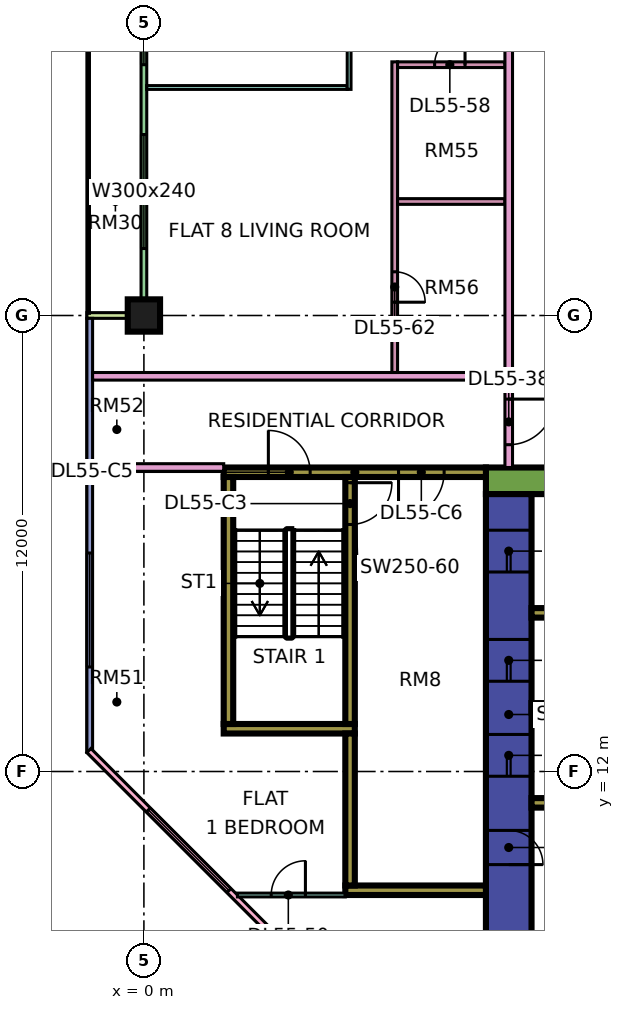
"""IFC4 building model, lengths in metres.
Left out: names, types, materials, properties, quantities, classifications, styles, units other than length and angle.
Written with IfcOpenShell. Run it as: python <this file> out.ifc"""

import sys

from ifc_helpers import new_model, si_unit, direction, frame, frame_2d, origin, origin_2d, place, context, subcontext, project, spatial, rectangle, extrude, element, fill, save


model = new_model("IFC4")
c1 = context("Model", 3, precision=1e-05, world=origin(), true_north=direction((0.0, 1.0)))
c2 = subcontext(c1, "Body", "Model", "MODEL_VIEW")
j1 = project(units=[si_unit("LENGTHUNIT", "METRE"), si_unit("PLANEANGLEUNIT", "RADIAN")], contexts=[c1])
p1 = place(None, origin())
s1 = spatial("IfcSite", under=j1, at=p1, CompositionType="ELEMENT")
p2 = place(p1, origin())
s2 = spatial("IfcBuilding", under=s1, at=p2, CompositionType="ELEMENT")
p3 = place(p2, frame((0.0, 0.0, 234.15)))
s3 = spatial("IfcBuildingStorey", under=s2, at=p3, CompositionType="ELEMENT", Elevation=234.15)
p4 = place(p3, frame((0.0, 24.0, 0.0), z_axis=(0.0, 0.0, 1.0), x_axis=(1.0, 0.0, 0.0)))
e1 = element("IfcColumn", 1, at=p4, inside=s3, PredefinedType="COLUMN", context=c2, shape_type="SweptSolid", body=[
    extrude(rectangle(XDim=0.85, YDim=0.85, at=origin_2d()), origin(), (0.0, 0.0, 1.0), 3.75),
])
p5 = place(p3, frame((9.0, 19.65, 0.0), z_axis=(0.0, 0.0, 1.0), x_axis=(1.0, 0.0, 0.0)))
e2 = element("IfcWall", 2, at=p5, inside=s3, PredefinedType="SHEAR", context=c2, shape_type="SweptSolid", body=[
    extrude(rectangle(XDim=25.0, YDim=0.7, at=frame_2d((12.5, 0.0))), origin(), (0.0, 0.0, 1.0), 3.75),
])
p6 = place(p5, frame((19.1, 0.0, 0.0)))
e3 = element("IfcOpeningElement", 3, at=p6, cuts=e2, PredefinedType="OPENING", context=c2, shape_type="SweptSolid", body=[
    extrude(rectangle(XDim=1.8, YDim=2.4, at=frame_2d((0.9, 1.2))), frame((0.0, 0.36, 0.0), z_axis=(0.0, -1.0, 0.0), x_axis=(1.0, 0.0, 0.0)), (0.0, 0.0, 1.0), 0.72),
])
p7 = place(p3, frame((9.6, 7.7, 0.0), z_axis=(0.0, 0.0, 1.0), x_axis=(0.0, 1.0, 0.0)))
e4 = element("IfcWall", 4, at=p7, inside=s3, PredefinedType="SHEAR", context=c2, shape_type="SweptSolid", body=[
    extrude(rectangle(XDim=11.6, YDim=1.2, at=frame_2d((5.8, 0.0))), origin(), (0.0, 0.0, 1.0), 3.75),
])
p8 = place(p7, frame((4.175, 0.0, 0.0)))
e5 = element("IfcOpeningElement", 5, at=p8, cuts=e4, PredefinedType="OPENING", context=c2, shape_type="SweptSolid", body=[
    extrude(rectangle(XDim=1.1, YDim=2.2, at=frame_2d((0.55, 1.1))), frame((0.0, 0.61, 0.0), z_axis=(0.0, -1.0, 0.0), x_axis=(1.0, 0.0, 0.0)), (0.0, 0.0, 1.0), 1.22),
])
p9 = place(p7, frame((6.675, 0.0, 0.0)))
e6 = element("IfcOpeningElement", 6, at=p9, cuts=e4, PredefinedType="OPENING", context=c2, shape_type="SweptSolid", body=[
    extrude(rectangle(XDim=1.1, YDim=2.2, at=frame_2d((0.55, 1.1))), frame((0.0, 0.61, 0.0), z_axis=(0.0, -1.0, 0.0), x_axis=(1.0, 0.0, 0.0)), (0.0, 0.0, 1.0), 1.22),
])
p10 = place(p7, frame((9.55, 0.0, 0.0)))
e7 = element("IfcOpeningElement", 7, at=p10, cuts=e4, PredefinedType="OPENING", context=c2, shape_type="SweptSolid", body=[
    extrude(rectangle(XDim=1.1, YDim=2.2, at=frame_2d((0.55, 1.1))), frame((0.0, 0.61, 0.0), z_axis=(0.0, -1.0, 0.0), x_axis=(1.0, 0.0, 0.0)), (0.0, 0.0, 1.0), 1.22),
])
p11 = place(p7, frame((1.85, 0.0, 0.0)))
e8 = element("IfcOpeningElement", 8, at=p11, cuts=e4, PredefinedType="OPENING", context=c2, shape_type="SweptSolid", body=[
    extrude(rectangle(XDim=0.9, YDim=2.1, at=frame_2d((0.45, 1.05))), frame((0.0, 0.61, 0.0), z_axis=(0.0, -1.0, 0.0), x_axis=(1.0, 0.0, 0.0)), (0.0, 0.0, 1.0), 1.22),
])
for number, where, z_axis, x_axis in (
    (9, (10.2, 11.175, 0.0), (0.0, 0.0, 1.0), (1.0, 0.0, 0.0)),
    (10, (10.2, 13.675, 0.0), (0.0, 0.0, 1.0), (1.0, 0.0, 0.0)),
    (11, (10.2, 16.175, 0.0), (0.0, 0.0, 1.0), (1.0, 0.0, 0.0)),
):
    element("IfcWall", number, at=place(p3, frame(where, z_axis=z_axis, x_axis=x_axis)), inside=s3, PredefinedType="SHEAR", context=c2, shape_type="SweptSolid", body=[
        extrude(rectangle(XDim=3.0, YDim=0.25, at=frame_2d((1.5, 0.0))), origin(), (0.0, 0.0, 1.0), 3.75),
    ])
p12 = place(p3, frame((2.1, 19.875, 0.0), z_axis=(0.0, 0.0, 1.0), x_axis=(1.0, 0.0, 0.0)))
e12 = element("IfcWall", 12, at=p12, inside=s3, PredefinedType="SHEAR", context=c2, shape_type="SweptSolid", body=[
    extrude(rectangle(XDim=6.9, YDim=0.25, at=frame_2d((3.45, 0.0))), origin(), (0.0, 0.0, 1.0), 3.75),
])
p13 = place(p12, frame((1.175, 0.0, 0.0)))
e13 = element("IfcOpeningElement", 13, at=p13, cuts=e12, PredefinedType="OPENING", context=c2, shape_type="SweptSolid", body=[
    extrude(rectangle(XDim=1.1, YDim=2.2, at=frame_2d((0.55, 1.1))), frame((0.0, 0.135, 0.0), z_axis=(0.0, -1.0, 0.0), x_axis=(1.0, 0.0, 0.0)), (0.0, 0.0, 1.0), 0.27),
])
p14 = place(p12, frame((4.6, 0.0, 0.0)))
e14 = element("IfcOpeningElement", 14, at=p14, cuts=e12, PredefinedType="OPENING", context=c2, shape_type="SweptSolid", body=[
    extrude(rectangle(XDim=1.2, YDim=2.2, at=frame_2d((0.6, 1.1))), frame((0.0, 0.135, 0.0), z_axis=(0.0, -1.0, 0.0), x_axis=(1.0, 0.0, 0.0)), (0.0, 0.0, 1.0), 0.27),
])
p15 = place(p3, frame((2.1, 13.125, 0.0), z_axis=(0.0, 0.0, 1.0), x_axis=(1.0, 0.0, 0.0)))
e15 = element("IfcWall", 15, at=p15, inside=s3, PredefinedType="SHEAR", context=c2, shape_type="SweptSolid", body=[
    extrude(rectangle(XDim=3.45, YDim=0.25, at=frame_2d((1.725, 0.0))), origin(), (0.0, 0.0, 1.0), 3.75),
])
p16 = place(p3, frame((2.225, 13.25, 0.0), z_axis=(0.0, 0.0, 1.0), x_axis=(0.0, 1.0, 0.0)))
e16 = element("IfcWall", 16, at=p16, inside=s3, PredefinedType="SHEAR", context=c2, shape_type="SweptSolid", body=[
    extrude(rectangle(XDim=6.5, YDim=0.25, at=frame_2d((3.25, 0.0))), origin(), (0.0, 0.0, 1.0), 3.75),
])
p17 = place(p3, frame((5.425, 13.25, 0.0), z_axis=(0.0, 0.0, 1.0), x_axis=(0.0, 1.0, 0.0)))
e17 = element("IfcWall", 17, at=p17, inside=s3, PredefinedType="SHEAR", context=c2, shape_type="SweptSolid", body=[
    extrude(rectangle(XDim=6.5, YDim=0.25, at=frame_2d((3.25, 0.0))), origin(), (0.0, 0.0, 1.0), 3.75),
])
p18 = place(p17, frame((5.25, 0.0, 0.0)))
e18 = element("IfcOpeningElement", 18, at=p18, cuts=e17, PredefinedType="OPENING", context=c2, shape_type="SweptSolid", body=[
    extrude(rectangle(XDim=1.1, YDim=2.2, at=frame_2d((0.55, 1.1))), frame((0.0, 0.135, 0.0), z_axis=(0.0, -1.0, 0.0), x_axis=(1.0, 0.0, 0.0)), (0.0, 0.0, 1.0), 0.27),
])
p19 = place(p3, frame((5.3, 8.875, 0.0), z_axis=(0.0, 0.0, 1.0), x_axis=(1.0, 0.0, 0.0)))
e19 = element("IfcWall", 19, at=p19, inside=s3, PredefinedType="SHEAR", context=c2, shape_type="SweptSolid", body=[
    extrude(rectangle(XDim=3.7, YDim=0.25, at=frame_2d((1.85, 0.0))), origin(), (0.0, 0.0, 1.0), 3.75),
])
p20 = place(p3, frame((5.425, 9.0, 0.0), z_axis=(0.0, 0.0, 1.0), x_axis=(0.0, 1.0, 0.0)))
e20 = element("IfcWall", 20, at=p20, inside=s3, PredefinedType="SHEAR", context=c2, shape_type="SweptSolid", body=[
    extrude(rectangle(XDim=4.0, YDim=0.25, at=frame_2d((2.0, 0.0))), origin(), (0.0, 0.0, 1.0), 3.75),
])
p21 = place(p3, frame((0.0, 35.925, 0.0), z_axis=(0.0, 0.0, 1.0), x_axis=(0.0, -1.0, 0.0)))
e21 = element("IfcWall", 21, at=p21, inside=s3, PredefinedType="SOLIDWALL", context=c2, shape_type="SweptSolid", body=[
    extrude(rectangle(XDim=11.85, YDim=0.15, at=frame_2d((5.925, 0.0))), origin(), (0.0, 0.0, 1.0), 3.35),
])
p22 = place(p21, frame((1.087, 0.0, 0.0)))
e22 = element("IfcOpeningElement", 22, at=p22, cuts=e21, PredefinedType="OPENING", context=c2, shape_type="SweptSolid", body=[
    extrude(rectangle(XDim=1.2, YDim=2.4, at=frame_2d((0.6, 1.2))), frame((0.0, 0.085, 0.0), z_axis=(0.0, -1.0, 0.0), x_axis=(1.0, 0.0, 0.0)), (0.0, 0.0, 1.0), 0.17),
])
p23 = place(p21, frame((3.525, 0.0, 0.45)))
e23 = element("IfcOpeningElement", 23, at=p23, cuts=e21, PredefinedType="OPENING", context=c2, shape_type="SweptSolid", body=[
    extrude(rectangle(XDim=1.8, YDim=2.4, at=frame_2d((0.9, 1.2))), frame((0.0, 0.085, 0.0), z_axis=(0.0, -1.0, 0.0), x_axis=(1.0, 0.0, 0.0)), (0.0, 0.0, 1.0), 0.17),
])
p24 = place(p21, frame((7.163, 0.0, 0.45)))
e24 = element("IfcOpeningElement", 24, at=p24, cuts=e21, PredefinedType="OPENING", context=c2, shape_type="SweptSolid", body=[
    extrude(rectangle(XDim=3.0, YDim=2.4, at=frame_2d((1.5, 1.2))), frame((0.0, 0.085, 0.0), z_axis=(0.0, -1.0, 0.0), x_axis=(1.0, 0.0, 0.0)), (0.0, 0.0, 1.0), 0.17),
])
p25 = place(p3, frame((-1.5, 24.0, 0.0), z_axis=(0.0, 0.0, 1.0), x_axis=(1.0, 0.0, 0.0)))
e25 = element("IfcWall", 25, at=p25, inside=s3, PredefinedType="SOLIDWALL", context=c2, shape_type="SweptSolid", body=[
    extrude(rectangle(XDim=1.5, YDim=0.15, at=frame_2d((0.75, 0.0))), origin(), (0.0, 0.0, 1.0), 3.35),
])
p26 = place(p3, frame((-1.425, 23.925, 0.0), z_axis=(0.0, 0.0, 1.0), x_axis=(0.0, -1.0, 0.0)))
e26 = element("IfcWall", 26, at=p26, inside=s3, PredefinedType="SOLIDWALL", context=c2, shape_type="SweptSolid", body=[
    extrude(rectangle(XDim=11.425, YDim=0.15, at=frame_2d((5.712, 0.0))), origin(), (0.0, 0.0, 1.0), 3.35),
])
p27 = place(p26, frame((6.175, 0.0, 0.45)))
e27 = element("IfcOpeningElement", 27, at=p27, cuts=e26, PredefinedType="OPENING", context=c2, shape_type="SweptSolid", body=[
    extrude(rectangle(XDim=3.0, YDim=2.4, at=frame_2d((1.5, 1.2))), frame((0.0, 0.085, 0.0), z_axis=(0.0, -1.0, 0.0), x_axis=(1.0, 0.0, 0.0)), (0.0, 0.0, 1.0), 0.17),
])
p28 = place(p3, frame((-1.447, 12.553, 0.0), z_axis=(0.0, 0.0, 1.0), x_axis=(0.707106781187, -0.707106781187, 0.0)))
e28 = element("IfcWall", 28, at=p28, inside=s3, PredefinedType="SOLIDWALL", context=c2, shape_type="SweptSolid", body=[
    extrude(rectangle(XDim=19.799, YDim=0.15, at=frame_2d((9.899, 0.0))), origin(), (0.0, 0.0, 1.0), 3.35),
])
p29 = place(p28, frame((2.212, 0.0, 0.45)))
e29 = element("IfcOpeningElement", 29, at=p29, cuts=e28, PredefinedType="OPENING", context=c2, shape_type="SweptSolid", body=[
    extrude(rectangle(XDim=3.0, YDim=2.4, at=frame_2d((1.5, 1.2))), frame((0.0, 0.085, 0.0), z_axis=(0.0, -1.0, 0.0), x_axis=(1.0, 0.0, 0.0)), (0.0, 0.0, 1.0), 0.17),
])
p30 = place(p28, frame((10.216, 0.0, 0.45)))
e30 = element("IfcOpeningElement", 30, at=p30, cuts=e28, PredefinedType="OPENING", context=c2, shape_type="SweptSolid", body=[
    extrude(rectangle(XDim=3.0, YDim=2.4, at=frame_2d((1.5, 1.2))), frame((0.0, 0.085, 0.0), z_axis=(0.0, -1.0, 0.0), x_axis=(1.0, 0.0, 0.0)), (0.0, 0.0, 1.0), 0.17),
])
p31 = place(p3, frame((-1.35, 20.0, 0.0), z_axis=(0.0, 0.0, 1.0), x_axis=(1.0, 0.0, 0.0)))
e31 = element("IfcWall", 31, at=p31, inside=s3, PredefinedType="PARTITIONING", context=c2, shape_type="SweptSolid", body=[
    extrude(rectangle(XDim=3.45, YDim=0.2, at=frame_2d((1.725, 0.0))), origin(), (0.0, 0.0, 1.0), 3.35),
])
p32 = place(p3, frame((-1.35, 22.4, 0.0), z_axis=(0.0, 0.0, 1.0), x_axis=(1.0, 0.0, 0.0)))
e32 = element("IfcWall", 32, at=p32, inside=s3, PredefinedType="PARTITIONING", context=c2, shape_type="SweptSolid", body=[
    extrude(rectangle(XDim=10.85, YDim=0.2, at=frame_2d((5.425, 0.0))), origin(), (0.0, 0.0, 1.0), 3.35),
])
p33 = place(p3, frame((0.074, 30.0, 0.0), z_axis=(0.0, 0.0, 1.0), x_axis=(1.0, 0.0, 0.0)))
e33 = element("IfcWall", 33, at=p33, inside=s3, PredefinedType="PARTITIONING", context=c2, shape_type="SweptSolid", body=[
    extrude(rectangle(XDim=5.276, YDim=0.1, at=frame_2d((2.638, 0.0))), origin(), (0.0, 0.0, 1.0), 3.35),
])
p34 = place(p3, frame((2.461, 8.75, 0.0), z_axis=(0.0, 0.0, 1.0), x_axis=(1.0, 0.0, 0.0)))
e34 = element("IfcWall", 34, at=p34, inside=s3, PredefinedType="PARTITIONING", context=c2, shape_type="SweptSolid", body=[
    extrude(rectangle(XDim=2.839, YDim=0.1, at=frame_2d((1.419, 0.0))), origin(), (0.0, 0.0, 1.0), 3.35),
])
p35 = place(p34, frame((0.889, 0.0, 0.0)))
e35 = element("IfcOpeningElement", 35, at=p35, cuts=e34, PredefinedType="OPENING", context=c2, shape_type="SweptSolid", body=[
    extrude(rectangle(XDim=0.9, YDim=2.1, at=frame_2d((0.45, 1.05))), frame((0.0, 0.06, 0.0), z_axis=(0.0, -1.0, 0.0), x_axis=(1.0, 0.0, 0.0)), (0.0, 0.0, 1.0), 0.12),
])
p36 = place(p3, frame((5.4, 29.95, 0.0), z_axis=(0.0, 0.0, 1.0), x_axis=(0.0, 1.0, 0.0)))
e36 = element("IfcWall", 36, at=p36, inside=s3, PredefinedType="PARTITIONING", context=c2, shape_type="SweptSolid", body=[
    extrude(rectangle(XDim=5.95, YDim=0.1, at=frame_2d((2.975, 0.0))), origin(), (0.0, 0.0, 1.0), 3.35),
])
p37 = place(p36, frame((1.1, 0.0, 0.0)))
e37 = element("IfcOpeningElement", 37, at=p37, cuts=e36, PredefinedType="OPENING", context=c2, shape_type="SweptSolid", body=[
    extrude(rectangle(XDim=0.9, YDim=2.1, at=frame_2d((0.45, 1.05))), frame((0.0, 0.06, 0.0), z_axis=(0.0, -1.0, 0.0), x_axis=(1.0, 0.0, 0.0)), (0.0, 0.0, 1.0), 0.12),
])
p38 = place(p36, frame((4.1, 0.0, 0.0)))
e38 = element("IfcOpeningElement", 38, at=p38, cuts=e36, PredefinedType="OPENING", context=c2, shape_type="SweptSolid", body=[
    extrude(rectangle(XDim=0.9, YDim=2.1, at=frame_2d((0.45, 1.05))), frame((0.0, 0.06, 0.0), z_axis=(0.0, -1.0, 0.0), x_axis=(1.0, 0.0, 0.0)), (0.0, 0.0, 1.0), 0.12),
])
p39 = place(p3, frame((6.6, 22.5, 0.0), z_axis=(0.0, 0.0, 1.0), x_axis=(0.0, 1.0, 0.0)))
e39 = element("IfcWall", 39, at=p39, inside=s3, PredefinedType="PARTITIONING", context=c2, shape_type="SweptSolid", body=[
    extrude(rectangle(XDim=8.175, YDim=0.15, at=frame_2d((4.087, 0.0))), origin(), (0.0, 0.0, 1.0), 3.35),
])
p40 = place(p39, frame((1.85, 0.0, 0.0)))
e40 = element("IfcOpeningElement", 40, at=p40, cuts=e39, PredefinedType="OPENING", context=c2, shape_type="SweptSolid", body=[
    extrude(rectangle(XDim=0.8, YDim=2.1, at=frame_2d((0.4, 1.05))), frame((0.0, 0.085, 0.0), z_axis=(0.0, -1.0, 0.0), x_axis=(1.0, 0.0, 0.0)), (0.0, 0.0, 1.0), 0.17),
])
p41 = place(p3, frame((6.675, 27.0, 0.0), z_axis=(0.0, 0.0, 1.0), x_axis=(1.0, 0.0, 0.0)))
e41 = element("IfcWall", 41, at=p41, inside=s3, PredefinedType="PARTITIONING", context=c2, shape_type="SweptSolid", body=[
    extrude(rectangle(XDim=2.825, YDim=0.15, at=frame_2d((1.413, 0.0))), origin(), (0.0, 0.0, 1.0), 3.35),
])
p42 = place(p3, frame((6.675, 30.6, 0.0), z_axis=(0.0, 0.0, 1.0), x_axis=(1.0, 0.0, 0.0)))
e42 = element("IfcWall", 42, at=p42, inside=s3, PredefinedType="PARTITIONING", context=c2, shape_type="SweptSolid", body=[
    extrude(rectangle(XDim=2.825, YDim=0.15, at=frame_2d((1.413, 0.0))), origin(), (0.0, 0.0, 1.0), 3.35),
])
p43 = place(p42, frame((0.975, 0.0, 0.0)))
e43 = element("IfcOpeningElement", 43, at=p43, cuts=e42, PredefinedType="OPENING", context=c2, shape_type="SweptSolid", body=[
    extrude(rectangle(XDim=0.8, YDim=2.1, at=frame_2d((0.4, 1.05))), frame((0.0, 0.085, 0.0), z_axis=(0.0, -1.0, 0.0), x_axis=(1.0, 0.0, 0.0)), (0.0, 0.0, 1.0), 0.17),
])
p44 = place(p3, frame((9.6, 20.0, 0.0), z_axis=(0.0, 0.0, 1.0), x_axis=(0.0, 1.0, 0.0)))
e44 = element("IfcWall", 44, at=p44, inside=s3, PredefinedType="PARTITIONING", context=c2, shape_type="SweptSolid", body=[
    extrude(rectangle(XDim=42.926, YDim=0.2, at=frame_2d((21.463, 0.0))), origin(), (0.0, 0.0, 1.0), 3.35),
])
p45 = place(p44, frame((28.95, 0.0, 0.0)))
e45 = element("IfcOpeningElement", 45, at=p45, cuts=e44, PredefinedType="OPENING", context=c2, shape_type="SweptSolid", body=[
    extrude(rectangle(XDim=1.0, YDim=2.1, at=frame_2d((0.5, 1.05))), frame((0.0, 0.11, 0.0), z_axis=(0.0, -1.0, 0.0), x_axis=(1.0, 0.0, 0.0)), (0.0, 0.0, 1.0), 0.22),
])
p46 = place(p44, frame((31.95, 0.0, 0.0)))
e46 = element("IfcOpeningElement", 46, at=p46, cuts=e44, PredefinedType="OPENING", context=c2, shape_type="SweptSolid", body=[
    extrude(rectangle(XDim=1.0, YDim=2.1, at=frame_2d((0.5, 1.05))), frame((0.0, 0.11, 0.0), z_axis=(0.0, -1.0, 0.0), x_axis=(1.0, 0.0, 0.0)), (0.0, 0.0, 1.0), 0.22),
])
p47 = place(p44, frame((0.6, 0.0, 0.0)))
e47 = element("IfcOpeningElement", 47, at=p47, cuts=e44, PredefinedType="OPENING", context=c2, shape_type="SweptSolid", body=[
    extrude(rectangle(XDim=1.2, YDim=2.1, at=frame_2d((0.6, 1.05))), frame((0.0, 0.11, 0.0), z_axis=(0.0, -1.0, 0.0), x_axis=(1.0, 0.0, 0.0)), (0.0, 0.0, 1.0), 0.22),
])
p48 = place(p44, frame((11.25, 0.0, 0.0)))
e48 = element("IfcOpeningElement", 48, at=p48, cuts=e44, PredefinedType="OPENING", context=c2, shape_type="SweptSolid", body=[
    extrude(rectangle(XDim=1.0, YDim=2.1, at=frame_2d((0.5, 1.05))), frame((0.0, 0.11, 0.0), z_axis=(0.0, -1.0, 0.0), x_axis=(1.0, 0.0, 0.0)), (0.0, 0.0, 1.0), 0.22),
])
p49 = place(p23, origin())
e49 = element("IfcWindow", 49, at=p49, inside=s3, PartitioningType="SINGLE_PANEL", PredefinedType="WINDOW", context=c2, shape_type="SweptSolid", body=[
    extrude(rectangle(XDim=1.8, YDim=2.4, at=frame_2d((0.9, 1.2))), frame((0.0, 0.03, 0.0), z_axis=(0.0, -1.0, 0.0), x_axis=(1.0, 0.0, 0.0)), (0.0, 0.0, 1.0), 0.06),
])
fill(e23, e49)
p50 = place(p24, origin())
e50 = element("IfcWindow", 50, at=p50, inside=s3, PartitioningType="SINGLE_PANEL", PredefinedType="WINDOW", context=c2, shape_type="SweptSolid", body=[
    extrude(rectangle(XDim=3.0, YDim=2.4, at=frame_2d((1.5, 1.2))), frame((0.0, 0.03, 0.0), z_axis=(0.0, -1.0, 0.0), x_axis=(1.0, 0.0, 0.0)), (0.0, 0.0, 1.0), 0.06),
])
fill(e24, e50)
p51 = place(p27, origin())
e51 = element("IfcWindow", 51, at=p51, inside=s3, PartitioningType="SINGLE_PANEL", PredefinedType="WINDOW", context=c2, shape_type="SweptSolid", body=[
    extrude(rectangle(XDim=3.0, YDim=2.4, at=frame_2d((1.5, 1.2))), frame((0.0, 0.03, 0.0), z_axis=(0.0, -1.0, 0.0), x_axis=(1.0, 0.0, 0.0)), (0.0, 0.0, 1.0), 0.06),
])
fill(e27, e51)
p52 = place(p29, origin())
e52 = element("IfcWindow", 52, at=p52, inside=s3, PartitioningType="SINGLE_PANEL", PredefinedType="WINDOW", context=c2, shape_type="SweptSolid", body=[
    extrude(rectangle(XDim=3.0, YDim=2.4, at=frame_2d((1.5, 1.2))), frame((0.0, 0.03, 0.0), z_axis=(0.0, -1.0, 0.0), x_axis=(1.0, 0.0, 0.0)), (0.0, 0.0, 1.0), 0.06),
])
fill(e29, e52)
p53 = place(p8, origin())
e53 = element("IfcDoor", 53, at=p53, inside=s3, OperationType="DOUBLE_DOOR_SLIDING", PredefinedType="DOOR", context=c2, shape_type="SweptSolid", body=[
    extrude(rectangle(XDim=1.1, YDim=2.2, at=frame_2d((0.55, 1.1))), frame((0.0, 0.025, 0.0), z_axis=(0.0, -1.0, 0.0), x_axis=(1.0, 0.0, 0.0)), (0.0, 0.0, 1.0), 0.05),
])
fill(e5, e53)
p54 = place(p9, origin())
e54 = element("IfcDoor", 54, at=p54, inside=s3, OperationType="DOUBLE_DOOR_SLIDING", PredefinedType="DOOR", context=c2, shape_type="SweptSolid", body=[
    extrude(rectangle(XDim=1.1, YDim=2.2, at=frame_2d((0.55, 1.1))), frame((0.0, 0.025, 0.0), z_axis=(0.0, -1.0, 0.0), x_axis=(1.0, 0.0, 0.0)), (0.0, 0.0, 1.0), 0.05),
])
fill(e6, e54)
p55 = place(p10, origin())
e55 = element("IfcDoor", 55, at=p55, inside=s3, OperationType="DOUBLE_DOOR_SLIDING", PredefinedType="DOOR", context=c2, shape_type="SweptSolid", body=[
    extrude(rectangle(XDim=1.1, YDim=2.2, at=frame_2d((0.55, 1.1))), frame((0.0, 0.025, 0.0), z_axis=(0.0, -1.0, 0.0), x_axis=(1.0, 0.0, 0.0)), (0.0, 0.0, 1.0), 0.05),
])
fill(e7, e55)
p56 = place(p18, origin())
e56 = element("IfcDoor", 56, at=p56, inside=s3, OperationType="SINGLE_SWING_RIGHT", PredefinedType="DOOR", context=c2, shape_type="SweptSolid", body=[
    extrude(rectangle(XDim=1.1, YDim=2.2, at=frame_2d((0.55, 1.1))), frame((0.0, 0.025, 0.0), z_axis=(0.0, -1.0, 0.0), x_axis=(1.0, 0.0, 0.0)), (0.0, 0.0, 1.0), 0.05),
])
fill(e18, e56)
p57 = place(p11, frame((0.9, 0.0, 0.0), z_axis=(0.0, 0.0, 1.0), x_axis=(-1.0, 0.0, 0.0)))
e57 = element("IfcDoor", 57, at=p57, inside=s3, OperationType="SINGLE_SWING_LEFT", PredefinedType="DOOR", context=c2, shape_type="SweptSolid", body=[
    extrude(rectangle(XDim=0.9, YDim=2.1, at=frame_2d((0.45, 1.05))), frame((0.0, 0.025, 0.0), z_axis=(0.0, -1.0, 0.0), x_axis=(1.0, 0.0, 0.0)), (0.0, 0.0, 1.0), 0.05),
])
fill(e8, e57)
p58 = place(p13, origin())
e58 = element("IfcDoor", 58, at=p58, inside=s3, OperationType="SINGLE_SWING_LEFT", PredefinedType="DOOR", context=c2, shape_type="SweptSolid", body=[
    extrude(rectangle(XDim=1.1, YDim=2.2, at=frame_2d((0.55, 1.1))), frame((0.0, 0.025, 0.0), z_axis=(0.0, -1.0, 0.0), x_axis=(1.0, 0.0, 0.0)), (0.0, 0.0, 1.0), 0.05),
])
fill(e13, e58)
p59 = place(p14, frame((1.2, 0.0, 0.0), z_axis=(0.0, 0.0, 1.0), x_axis=(-1.0, 0.0, 0.0)))
e59 = element("IfcDoor", 59, at=p59, inside=s3, OperationType="SINGLE_SWING_LEFT", PredefinedType="DOOR", context=c2, shape_type="SweptSolid", body=[
    extrude(rectangle(XDim=1.2, YDim=2.2, at=frame_2d((0.6, 1.1))), frame((0.0, 0.025, 0.0), z_axis=(0.0, -1.0, 0.0), x_axis=(1.0, 0.0, 0.0)), (0.0, 0.0, 1.0), 0.05),
])
fill(e14, e59)
p60 = place(p47, origin())
e60 = element("IfcDoor", 60, at=p60, inside=s3, OperationType="SINGLE_SWING_RIGHT", PredefinedType="DOOR", context=c2, shape_type="SweptSolid", body=[
    extrude(rectangle(XDim=1.2, YDim=2.1, at=frame_2d((0.6, 1.05))), frame((0.0, 0.025, 0.0), z_axis=(0.0, -1.0, 0.0), x_axis=(1.0, 0.0, 0.0)), (0.0, 0.0, 1.0), 0.05),
])
fill(e47, e60)
p61 = place(p35, frame((0.9, 0.0, 0.0), z_axis=(0.0, 0.0, 1.0), x_axis=(-1.0, 0.0, 0.0)))
e61 = element("IfcDoor", 61, at=p61, inside=s3, OperationType="SINGLE_SWING_RIGHT", PredefinedType="DOOR", context=c2, shape_type="SweptSolid", body=[
    extrude(rectangle(XDim=0.9, YDim=2.1, at=frame_2d((0.45, 1.05))), frame((0.0, 0.025, 0.0), z_axis=(0.0, -1.0, 0.0), x_axis=(1.0, 0.0, 0.0)), (0.0, 0.0, 1.0), 0.05),
])
fill(e35, e61)
p62 = place(p43, frame((0.8, 0.0, 0.0), z_axis=(0.0, 0.0, 1.0), x_axis=(-1.0, 0.0, 0.0)))
e62 = element("IfcDoor", 62, at=p62, inside=s3, OperationType="SINGLE_SWING_RIGHT", PredefinedType="DOOR", context=c2, shape_type="SweptSolid", body=[
    extrude(rectangle(XDim=0.8, YDim=2.1, at=frame_2d((0.4, 1.05))), frame((0.0, 0.025, 0.0), z_axis=(0.0, -1.0, 0.0), x_axis=(1.0, 0.0, 0.0)), (0.0, 0.0, 1.0), 0.05),
])
fill(e43, e62)
p63 = place(p40, frame((0.8, 0.0, 0.0), z_axis=(0.0, 0.0, 1.0), x_axis=(-1.0, 0.0, 0.0)))
e63 = element("IfcDoor", 63, at=p63, inside=s3, OperationType="SINGLE_SWING_LEFT", PredefinedType="DOOR", context=c2, shape_type="SweptSolid", body=[
    extrude(rectangle(XDim=0.8, YDim=2.1, at=frame_2d((0.4, 1.05))), frame((0.0, 0.025, 0.0), z_axis=(0.0, -1.0, 0.0), x_axis=(1.0, 0.0, 0.0)), (0.0, 0.0, 1.0), 0.05),
])
fill(e40, e63)
save(model, sys.argv[1])
